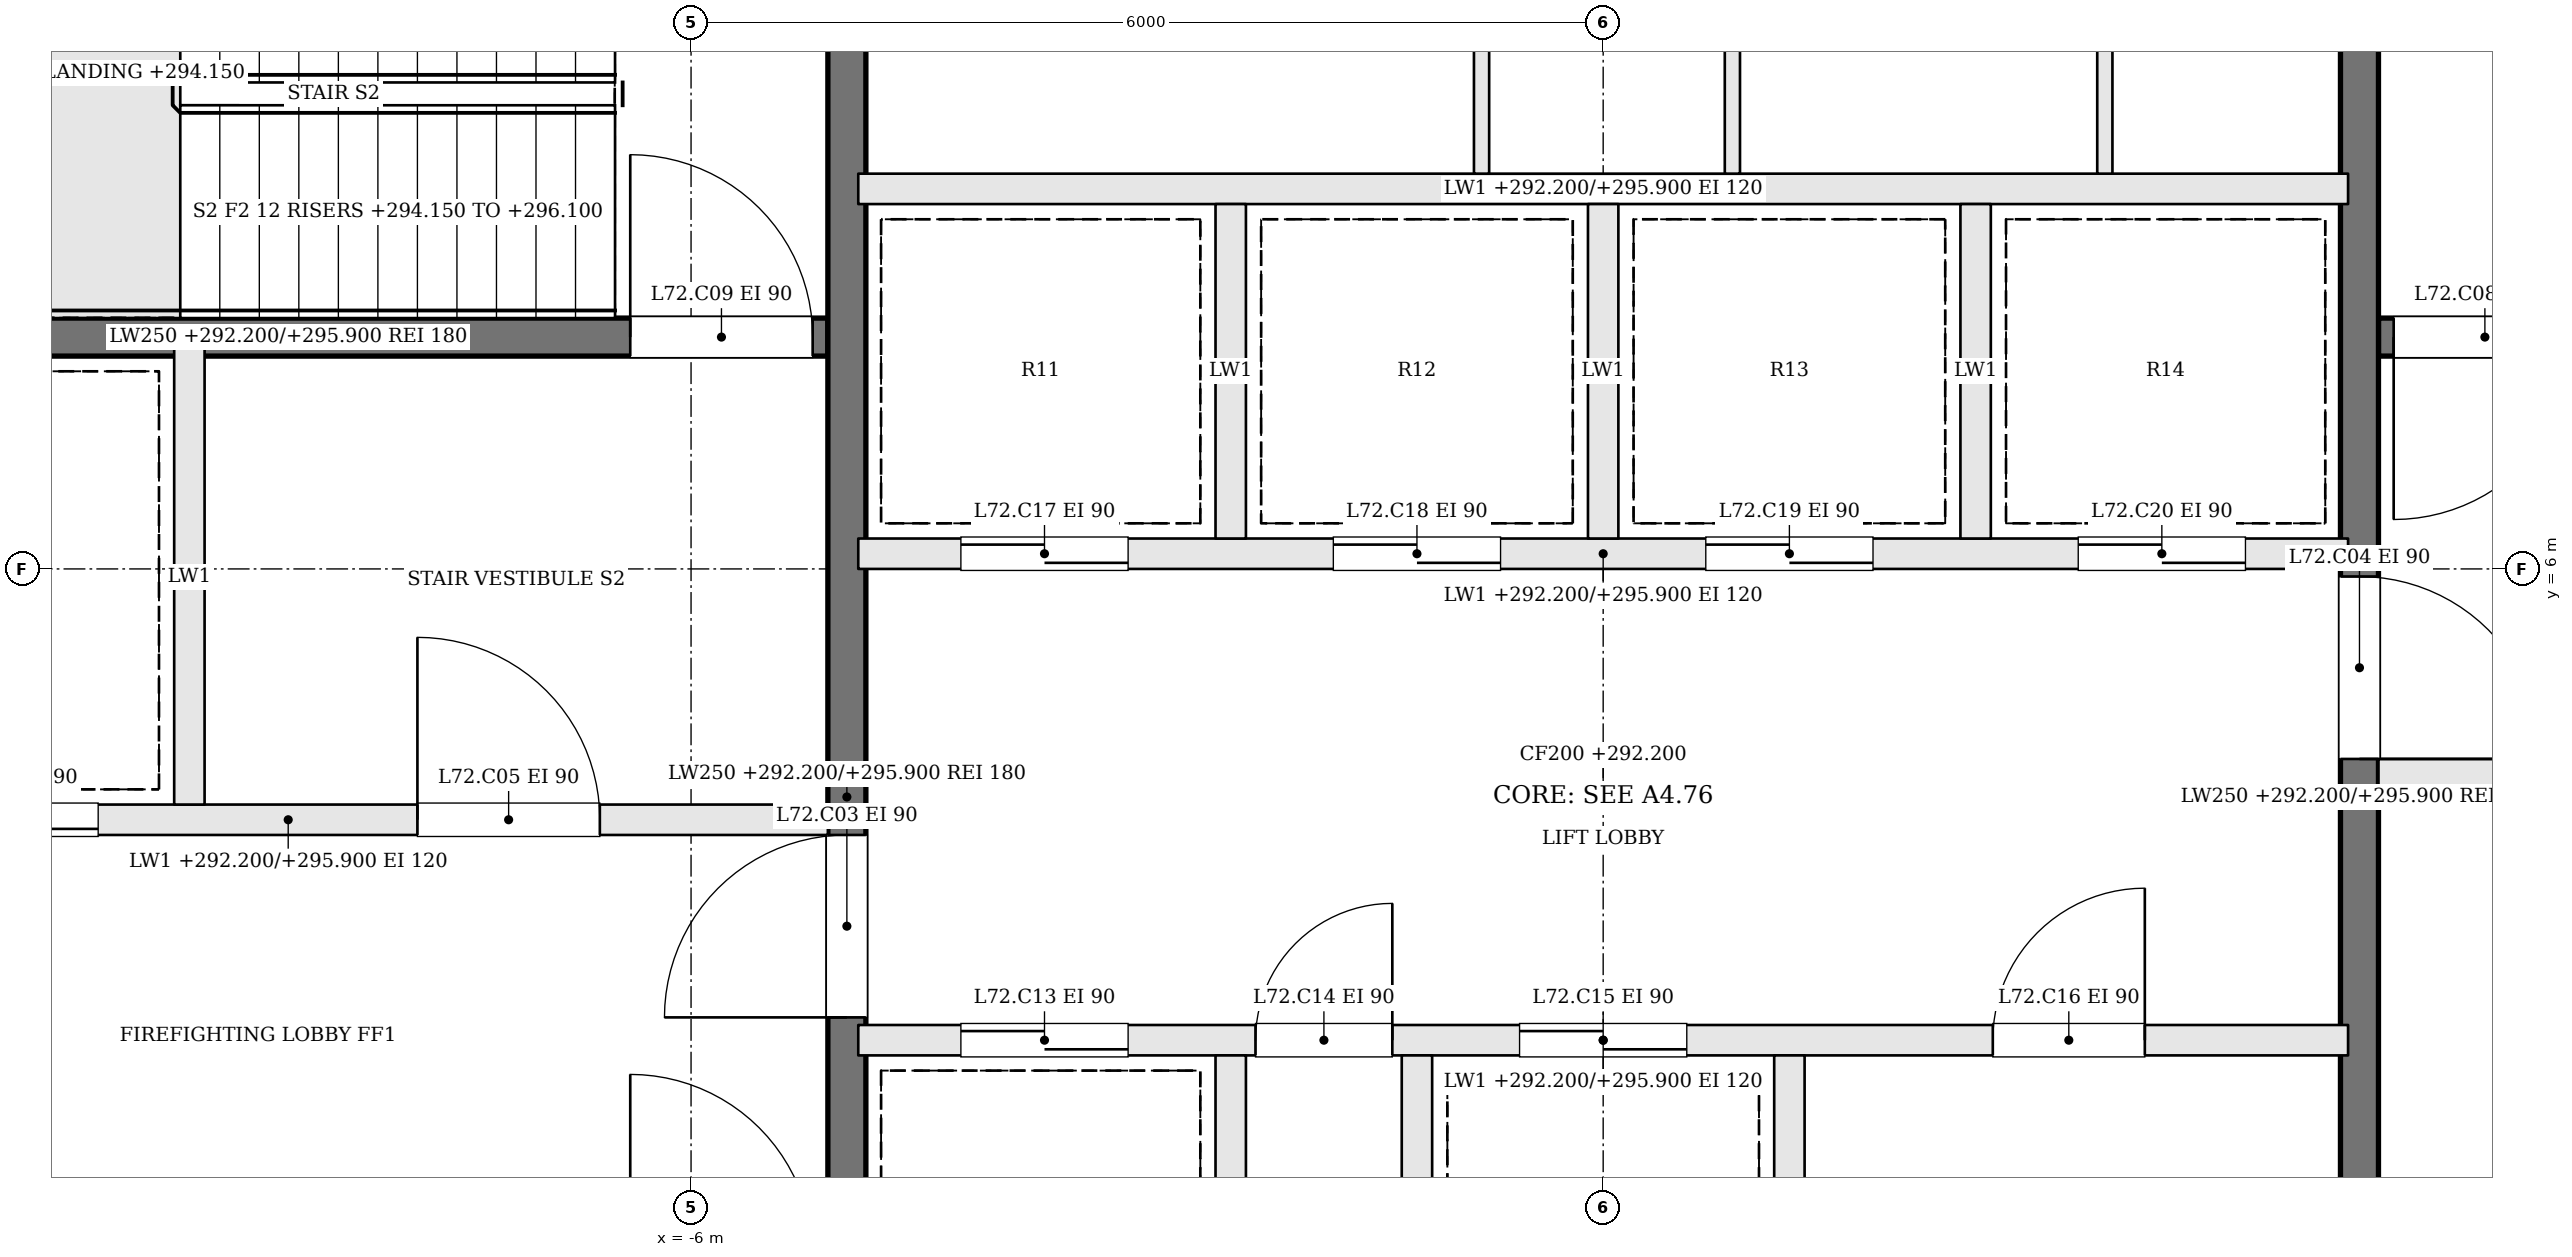
"""IFC4 building model, lengths in metres.
Left out: names, types, materials, properties, quantities, classifications, styles, units other than length and angle.
Written with IfcOpenShell. Run it as: python <this file> out.ifc"""

import sys

from ifc_helpers import new_model, si_unit, direction, frame, frame_2d, origin, place, context, subcontext, project, spatial, rectangle, extrude, element, fill, save


model = new_model("IFC4")
c1 = context("Model", 3, precision=1e-05, world=origin(), true_north=direction((0.0, 1.0)))
c2 = subcontext(c1, "Body", "Model", "MODEL_VIEW")
j1 = project(units=[si_unit("LENGTHUNIT", "METRE"), si_unit("PLANEANGLEUNIT", "RADIAN")], contexts=[c1])
p1 = place(None, origin())
s1 = spatial("IfcSite", under=j1, at=p1, CompositionType="ELEMENT")
p2 = place(p1, origin())
s2 = spatial("IfcBuilding", under=s1, at=p2, CompositionType="ELEMENT")
p3 = place(p2, frame((0.0, 0.0, 292.2)))
s3 = spatial("IfcBuildingStorey", under=s2, at=p3, CompositionType="ELEMENT", Elevation=292.2)
p4 = place(p3, frame((12.2, 7.525, 0.0), z_axis=(0.0, 0.0, 1.0), x_axis=(-1.0, 0.0, 0.0)))
e1 = element("IfcWall", 1, at=p4, inside=s3, PredefinedType="SOLIDWALL", context=c2, shape_type="SweptSolid", body=[
    extrude(rectangle(XDim=7.1, YDim=0.25, at=frame_2d((3.55, 0.0))), origin(), (0.0, 0.0, 1.0), 3.7),
])
p5 = place(p4, frame((5.8, 0.0, 0.0)))
e2 = element("IfcOpeningElement", 2, at=p5, cuts=e1, PredefinedType="OPENING", context=c2, shape_type="SweptSolid", body=[
    extrude(rectangle(XDim=1.2, YDim=2.1, at=frame_2d((0.6, 1.05))), frame((0.0, 0.135, 0.0), z_axis=(0.0, -1.0, 0.0), x_axis=(1.0, 0.0, 0.0)), (0.0, 0.0, 1.0), 0.27),
])
p6 = place(p3, frame((-12.2, 4.35, 0.0), z_axis=(0.0, 0.0, 1.0), x_axis=(1.0, 0.0, 0.0)))
e3 = element("IfcWall", 3, at=p6, inside=s3, PredefinedType="SOLIDWALL", context=c2, shape_type="SweptSolid", body=[
    extrude(rectangle(XDim=7.1, YDim=0.2, at=frame_2d((3.55, 0.0))), origin(), (0.0, 0.0, 1.0), 3.7),
])
p7 = place(p6, frame((4.4, 0.0, 0.0)))
e4 = element("IfcOpeningElement", 4, at=p7, cuts=e3, PredefinedType="OPENING", context=c2, shape_type="SweptSolid", body=[
    extrude(rectangle(XDim=1.2, YDim=2.1, at=frame_2d((0.6, 1.05))), frame((0.0, 0.11, 0.0), z_axis=(0.0, -1.0, 0.0), x_axis=(1.0, 0.0, 0.0)), (0.0, 0.0, 1.0), 0.22),
])
p8 = place(p6, frame((1.1, 0.0, 0.0)))
e5 = element("IfcOpeningElement", 5, at=p8, cuts=e3, PredefinedType="OPENING", context=c2, shape_type="SweptSolid", body=[
    extrude(rectangle(XDim=1.2, YDim=2.1, at=frame_2d((0.6, 1.05))), frame((0.0, 0.11, 0.0), z_axis=(0.0, -1.0, 0.0), x_axis=(1.0, 0.0, 0.0)), (0.0, 0.0, 1.0), 0.22),
])
p9 = place(p3, frame((12.2, 4.65, 0.0), z_axis=(0.0, 0.0, 1.0), x_axis=(-1.0, 0.0, 0.0)))
e6 = element("IfcWall", 6, at=p9, inside=s3, PredefinedType="SOLIDWALL", context=c2, shape_type="SweptSolid", body=[
    extrude(rectangle(XDim=7.1, YDim=0.2, at=frame_2d((3.55, 0.0))), origin(), (0.0, 0.0, 1.0), 3.7),
])
p10 = place(p9, frame((4.4, 0.0, 0.0)))
e7 = element("IfcOpeningElement", 7, at=p10, cuts=e6, PredefinedType="OPENING", context=c2, shape_type="SweptSolid", body=[
    extrude(rectangle(XDim=1.2, YDim=2.1, at=frame_2d((0.6, 1.05))), frame((0.0, 0.11, 0.0), z_axis=(0.0, -1.0, 0.0), x_axis=(1.0, 0.0, 0.0)), (0.0, 0.0, 1.0), 0.22),
])
p11 = place(p9, frame((1.1, 0.0, 0.0)))
e8 = element("IfcOpeningElement", 8, at=p11, cuts=e6, PredefinedType="OPENING", context=c2, shape_type="SweptSolid", body=[
    extrude(rectangle(XDim=1.2, YDim=2.1, at=frame_2d((0.6, 1.05))), frame((0.0, 0.11, 0.0), z_axis=(0.0, -1.0, 0.0), x_axis=(1.0, 0.0, 0.0)), (0.0, 0.0, 1.0), 0.22),
])
p12 = place(p3, frame((-12.2, 7.525, 0.0), z_axis=(0.0, 0.0, 1.0), x_axis=(1.0, 0.0, 0.0)))
e9 = element("IfcWall", 9, at=p12, inside=s3, PredefinedType="SOLIDWALL", context=c2, shape_type="SweptSolid", body=[
    extrude(rectangle(XDim=7.1, YDim=0.25, at=frame_2d((3.55, 0.0))), origin(), (0.0, 0.0, 1.0), 3.7),
])
p13 = place(p12, frame((5.8, 0.0, 0.0)))
e10 = element("IfcOpeningElement", 10, at=p13, cuts=e9, PredefinedType="OPENING", context=c2, shape_type="SweptSolid", body=[
    extrude(rectangle(XDim=1.2, YDim=2.1, at=frame_2d((0.6, 1.05))), frame((0.0, 0.135, 0.0), z_axis=(0.0, -1.0, 0.0), x_axis=(1.0, 0.0, 0.0)), (0.0, 0.0, 1.0), 0.27),
])
p14 = place(p3, frame((-9.3, 4.45, 0.0), z_axis=(0.0, 0.0, 1.0), x_axis=(0.0, 1.0, 0.0)))
e11 = element("IfcWall", 11, at=p14, inside=s3, PredefinedType="SOLIDWALL", context=c2, shape_type="SweptSolid", body=[
    extrude(rectangle(XDim=3.0, YDim=0.2, at=frame_2d((1.5, 0.0))), origin(), (0.0, 0.0, 1.0), 3.7),
])
p15 = place(p3, frame((-4.975, -2.2, 0.0), z_axis=(0.0, 0.0, 1.0), x_axis=(0.0, 1.0, 0.0)))
e12 = element("IfcWall", 12, at=p15, inside=s3, PredefinedType="SOLIDWALL", context=c2, shape_type="SweptSolid", body=[
    extrude(rectangle(XDim=13.4, YDim=0.25, at=frame_2d((6.7, 0.0))), origin(), (0.0, 0.0, 1.0), 3.7),
])
p16 = place(p15, frame((5.25, 0.0, 0.0)))
e13 = element("IfcOpeningElement", 13, at=p16, cuts=e12, PredefinedType="OPENING", context=c2, shape_type="SweptSolid", body=[
    extrude(rectangle(XDim=1.2, YDim=2.1, at=frame_2d((0.6, 1.05))), frame((0.0, 0.135, 0.0), z_axis=(0.0, -1.0, 0.0), x_axis=(1.0, 0.0, 0.0)), (0.0, 0.0, 1.0), 0.27),
])
p17 = place(p3, frame((4.975, 11.2, 0.0), z_axis=(0.0, 0.0, 1.0), x_axis=(0.0, -1.0, 0.0)))
e14 = element("IfcWall", 14, at=p17, inside=s3, PredefinedType="SOLIDWALL", context=c2, shape_type="SweptSolid", body=[
    extrude(rectangle(XDim=13.4, YDim=0.25, at=frame_2d((6.7, 0.0))), origin(), (0.0, 0.0, 1.0), 3.7),
])
p18 = place(p17, frame((5.25, 0.0, 0.0)))
e15 = element("IfcOpeningElement", 15, at=p18, cuts=e14, PredefinedType="OPENING", context=c2, shape_type="SweptSolid", body=[
    extrude(rectangle(XDim=1.2, YDim=2.1, at=frame_2d((0.6, 1.05))), frame((0.0, 0.135, 0.0), z_axis=(0.0, -1.0, 0.0), x_axis=(1.0, 0.0, 0.0)), (0.0, 0.0, 1.0), 0.27),
])
p19 = place(p3, frame((-4.9, 2.9, 0.0), z_axis=(0.0, 0.0, 1.0), x_axis=(1.0, 0.0, 0.0)))
e16 = element("IfcWall", 16, at=p19, inside=s3, PredefinedType="SOLIDWALL", context=c2, shape_type="SweptSolid", body=[
    extrude(rectangle(XDim=9.8, YDim=0.2, at=frame_2d((4.9, 0.0))), origin(), (0.0, 0.0, 1.0), 3.7),
])
p20 = place(p19, frame((0.675, 0.0, 0.0)))
e17 = element("IfcOpeningElement", 17, at=p20, cuts=e16, PredefinedType="OPENING", context=c2, shape_type="SweptSolid", body=[
    extrude(rectangle(XDim=1.1, YDim=2.1, at=frame_2d((0.55, 1.05))), frame((0.0, 0.11, 0.0), z_axis=(0.0, -1.0, 0.0), x_axis=(1.0, 0.0, 0.0)), (0.0, 0.0, 1.0), 0.22),
])
p21 = place(p19, frame((2.613, 0.0, 0.0)))
e18 = element("IfcOpeningElement", 18, at=p21, cuts=e16, PredefinedType="OPENING", context=c2, shape_type="SweptSolid", body=[
    extrude(rectangle(XDim=0.9, YDim=2.1, at=frame_2d((0.45, 1.05))), frame((0.0, 0.11, 0.0), z_axis=(0.0, -1.0, 0.0), x_axis=(1.0, 0.0, 0.0)), (0.0, 0.0, 1.0), 0.22),
])
p22 = place(p19, frame((4.35, 0.0, 0.0)))
e19 = element("IfcOpeningElement", 19, at=p22, cuts=e16, PredefinedType="OPENING", context=c2, shape_type="SweptSolid", body=[
    extrude(rectangle(XDim=1.1, YDim=2.1, at=frame_2d((0.55, 1.05))), frame((0.0, 0.11, 0.0), z_axis=(0.0, -1.0, 0.0), x_axis=(1.0, 0.0, 0.0)), (0.0, 0.0, 1.0), 0.22),
])
p23 = place(p19, frame((7.463, 0.0, 0.0)))
e20 = element("IfcOpeningElement", 20, at=p23, cuts=e16, PredefinedType="OPENING", context=c2, shape_type="SweptSolid", body=[
    extrude(rectangle(XDim=1.0, YDim=2.1, at=frame_2d((0.5, 1.05))), frame((0.0, 0.11, 0.0), z_axis=(0.0, -1.0, 0.0), x_axis=(1.0, 0.0, 0.0)), (0.0, 0.0, 1.0), 0.22),
])
p24 = place(p3, frame((-4.9, 6.1, 0.0), z_axis=(0.0, 0.0, 1.0), x_axis=(1.0, 0.0, 0.0)))
e21 = element("IfcWall", 21, at=p24, inside=s3, PredefinedType="SOLIDWALL", context=c2, shape_type="SweptSolid", body=[
    extrude(rectangle(XDim=9.8, YDim=0.2, at=frame_2d((4.9, 0.0))), origin(), (0.0, 0.0, 1.0), 3.7),
])
p25 = place(p24, frame((0.675, 0.0, 0.0)))
e22 = element("IfcOpeningElement", 22, at=p25, cuts=e21, PredefinedType="OPENING", context=c2, shape_type="SweptSolid", body=[
    extrude(rectangle(XDim=1.1, YDim=2.1, at=frame_2d((0.55, 1.05))), frame((0.0, 0.11, 0.0), z_axis=(0.0, -1.0, 0.0), x_axis=(1.0, 0.0, 0.0)), (0.0, 0.0, 1.0), 0.22),
])
p26 = place(p24, frame((3.125, 0.0, 0.0)))
e23 = element("IfcOpeningElement", 23, at=p26, cuts=e21, PredefinedType="OPENING", context=c2, shape_type="SweptSolid", body=[
    extrude(rectangle(XDim=1.1, YDim=2.1, at=frame_2d((0.55, 1.05))), frame((0.0, 0.11, 0.0), z_axis=(0.0, -1.0, 0.0), x_axis=(1.0, 0.0, 0.0)), (0.0, 0.0, 1.0), 0.22),
])
p27 = place(p24, frame((5.575, 0.0, 0.0)))
e24 = element("IfcOpeningElement", 24, at=p27, cuts=e21, PredefinedType="OPENING", context=c2, shape_type="SweptSolid", body=[
    extrude(rectangle(XDim=1.1, YDim=2.1, at=frame_2d((0.55, 1.05))), frame((0.0, 0.11, 0.0), z_axis=(0.0, -1.0, 0.0), x_axis=(1.0, 0.0, 0.0)), (0.0, 0.0, 1.0), 0.22),
])
p28 = place(p24, frame((8.025, 0.0, 0.0)))
e25 = element("IfcOpeningElement", 25, at=p28, cuts=e21, PredefinedType="OPENING", context=c2, shape_type="SweptSolid", body=[
    extrude(rectangle(XDim=1.1, YDim=2.1, at=frame_2d((0.55, 1.05))), frame((0.0, 0.11, 0.0), z_axis=(0.0, -1.0, 0.0), x_axis=(1.0, 0.0, 0.0)), (0.0, 0.0, 1.0), 0.22),
])
p29 = place(p3, frame((-4.9, 8.5, 0.0), z_axis=(0.0, 0.0, 1.0), x_axis=(1.0, 0.0, 0.0)))
e26 = element("IfcWall", 26, at=p29, inside=s3, PredefinedType="SOLIDWALL", context=c2, shape_type="SweptSolid", body=[
    extrude(rectangle(XDim=9.8, YDim=0.2, at=frame_2d((4.9, 0.0))), origin(), (0.0, 0.0, 1.0), 3.7),
])
for number, where, z_axis, x_axis in (
    (27, (-2.45, 0.6, 0.0), (0.0, 0.0, 1.0), (0.0, 1.0, 0.0)),
    (28, (-1.225, 0.6, 0.0), (0.0, 0.0, 1.0), (0.0, 1.0, 0.0)),
    (29, (1.225, 0.6, 0.0), (0.0, 0.0, 1.0), (0.0, 1.0, 0.0)),
    (30, (-2.45, 6.2, 0.0), (0.0, 0.0, 1.0), (0.0, 1.0, 0.0)),
    (31, (0.0, 6.2, 0.0), (0.0, 0.0, 1.0), (0.0, 1.0, 0.0)),
    (32, (2.45, 6.2, 0.0), (0.0, 0.0, 1.0), (0.0, 1.0, 0.0)),
):
    element("IfcWall", number, at=place(p3, frame(where, z_axis=z_axis, x_axis=x_axis)), inside=s3, PredefinedType="SOLIDWALL", context=c2, shape_type="SweptSolid", body=[
        extrude(rectangle(XDim=2.2, YDim=0.2, at=frame_2d((1.1, 0.0))), origin(), (0.0, 0.0, 1.0), 3.7),
    ])
for number, where, z_axis, x_axis in (
    (33, (-0.8, 8.6, 0.0), (0.0, 0.0, 1.0), (0.0, 1.0, 0.0)),
    (34, (0.85, 8.6, 0.0), (0.0, 0.0, 1.0), (0.0, 1.0, 0.0)),
    (35, (3.3, 8.6, 0.0), (0.0, 0.0, 1.0), (0.0, 1.0, 0.0)),
):
    element("IfcWall", number, at=place(p3, frame(where, z_axis=z_axis, x_axis=x_axis)), inside=s3, PredefinedType="PARTITIONING", context=c2, shape_type="SweptSolid", body=[
        extrude(rectangle(XDim=2.6, YDim=0.1, at=frame_2d((1.3, 0.0))), origin(), (0.0, 0.0, 1.0), 3.7),
    ])
p30 = place(p16, origin())
e36 = element("IfcDoor", 36, at=p30, inside=s3, OperationType="SINGLE_SWING_LEFT", PredefinedType="DOOR", context=c2, shape_type="SweptSolid", body=[
    extrude(rectangle(XDim=1.2, YDim=2.1, at=frame_2d((0.6, 1.05))), frame((0.0, 0.025, 0.0), z_axis=(0.0, -1.0, 0.0), x_axis=(1.0, 0.0, 0.0)), (0.0, 0.0, 1.0), 0.05),
])
fill(e13, e36)
p31 = place(p18, origin())
e37 = element("IfcDoor", 37, at=p31, inside=s3, OperationType="SINGLE_SWING_RIGHT", PredefinedType="DOOR", context=c2, shape_type="SweptSolid", body=[
    extrude(rectangle(XDim=1.2, YDim=2.1, at=frame_2d((0.6, 1.05))), frame((0.0, 0.025, 0.0), z_axis=(0.0, -1.0, 0.0), x_axis=(1.0, 0.0, 0.0)), (0.0, 0.0, 1.0), 0.05),
])
fill(e15, e37)
p32 = place(p7, origin())
e38 = element("IfcDoor", 38, at=p32, inside=s3, OperationType="SINGLE_SWING_LEFT", PredefinedType="DOOR", context=c2, shape_type="SweptSolid", body=[
    extrude(rectangle(XDim=1.2, YDim=2.1, at=frame_2d((0.6, 1.05))), frame((0.0, 0.025, 0.0), z_axis=(0.0, -1.0, 0.0), x_axis=(1.0, 0.0, 0.0)), (0.0, 0.0, 1.0), 0.05),
])
fill(e4, e38)
p33 = place(p5, origin())
e39 = element("IfcDoor", 39, at=p33, inside=s3, OperationType="SINGLE_SWING_RIGHT", PredefinedType="DOOR", context=c2, shape_type="SweptSolid", body=[
    extrude(rectangle(XDim=1.2, YDim=2.1, at=frame_2d((0.6, 1.05))), frame((0.0, 0.025, 0.0), z_axis=(0.0, -1.0, 0.0), x_axis=(1.0, 0.0, 0.0)), (0.0, 0.0, 1.0), 0.05),
])
fill(e2, e39)
p34 = place(p13, origin())
e40 = element("IfcDoor", 40, at=p34, inside=s3, OperationType="SINGLE_SWING_LEFT", PredefinedType="DOOR", context=c2, shape_type="SweptSolid", body=[
    extrude(rectangle(XDim=1.2, YDim=2.1, at=frame_2d((0.6, 1.05))), frame((0.0, 0.025, 0.0), z_axis=(0.0, -1.0, 0.0), x_axis=(1.0, 0.0, 0.0)), (0.0, 0.0, 1.0), 0.05),
])
fill(e10, e40)
p35 = place(p8, origin())
e41 = element("IfcDoor", 41, at=p35, inside=s3, OperationType="SLIDING_TO_RIGHT", PredefinedType="DOOR", context=c2, shape_type="SweptSolid", body=[
    extrude(rectangle(XDim=1.2, YDim=2.1, at=frame_2d((0.6, 1.05))), frame((0.0, 0.025, 0.0), z_axis=(0.0, -1.0, 0.0), x_axis=(1.0, 0.0, 0.0)), (0.0, 0.0, 1.0), 0.05),
])
fill(e5, e41)
p36 = place(p20, origin())
e42 = element("IfcDoor", 42, at=p36, inside=s3, OperationType="SLIDING_TO_RIGHT", PredefinedType="DOOR", context=c2, shape_type="SweptSolid", body=[
    extrude(rectangle(XDim=1.1, YDim=2.1, at=frame_2d((0.55, 1.05))), frame((0.0, 0.025, 0.0), z_axis=(0.0, -1.0, 0.0), x_axis=(1.0, 0.0, 0.0)), (0.0, 0.0, 1.0), 0.05),
])
fill(e17, e42)
p37 = place(p21, origin())
e43 = element("IfcDoor", 43, at=p37, inside=s3, OperationType="SINGLE_SWING_RIGHT", PredefinedType="DOOR", context=c2, shape_type="SweptSolid", body=[
    extrude(rectangle(XDim=0.9, YDim=2.1, at=frame_2d((0.45, 1.05))), frame((0.0, 0.025, 0.0), z_axis=(0.0, -1.0, 0.0), x_axis=(1.0, 0.0, 0.0)), (0.0, 0.0, 1.0), 0.05),
])
fill(e18, e43)
p38 = place(p22, origin())
e44 = element("IfcDoor", 44, at=p38, inside=s3, OperationType="SLIDING_TO_LEFT", PredefinedType="DOOR", context=c2, shape_type="SweptSolid", body=[
    extrude(rectangle(XDim=1.1, YDim=2.1, at=frame_2d((0.55, 1.05))), frame((0.0, 0.025, 0.0), z_axis=(0.0, -1.0, 0.0), x_axis=(1.0, 0.0, 0.0)), (0.0, 0.0, 1.0), 0.05),
])
fill(e19, e44)
p39 = place(p23, origin())
e45 = element("IfcDoor", 45, at=p39, inside=s3, OperationType="SINGLE_SWING_RIGHT", PredefinedType="DOOR", context=c2, shape_type="SweptSolid", body=[
    extrude(rectangle(XDim=1.0, YDim=2.1, at=frame_2d((0.5, 1.05))), frame((0.0, 0.025, 0.0), z_axis=(0.0, -1.0, 0.0), x_axis=(1.0, 0.0, 0.0)), (0.0, 0.0, 1.0), 0.05),
])
fill(e20, e45)
p40 = place(p25, origin())
e46 = element("IfcDoor", 46, at=p40, inside=s3, OperationType="SLIDING_TO_RIGHT", PredefinedType="DOOR", context=c2, shape_type="SweptSolid", body=[
    extrude(rectangle(XDim=1.1, YDim=2.1, at=frame_2d((0.55, 1.05))), frame((0.0, 0.025, 0.0), z_axis=(0.0, -1.0, 0.0), x_axis=(1.0, 0.0, 0.0)), (0.0, 0.0, 1.0), 0.05),
])
fill(e22, e46)
p41 = place(p26, origin())
e47 = element("IfcDoor", 47, at=p41, inside=s3, OperationType="SLIDING_TO_LEFT", PredefinedType="DOOR", context=c2, shape_type="SweptSolid", body=[
    extrude(rectangle(XDim=1.1, YDim=2.1, at=frame_2d((0.55, 1.05))), frame((0.0, 0.025, 0.0), z_axis=(0.0, -1.0, 0.0), x_axis=(1.0, 0.0, 0.0)), (0.0, 0.0, 1.0), 0.05),
])
fill(e23, e47)
p42 = place(p27, origin())
e48 = element("IfcDoor", 48, at=p42, inside=s3, OperationType="SLIDING_TO_RIGHT", PredefinedType="DOOR", context=c2, shape_type="SweptSolid", body=[
    extrude(rectangle(XDim=1.1, YDim=2.1, at=frame_2d((0.55, 1.05))), frame((0.0, 0.025, 0.0), z_axis=(0.0, -1.0, 0.0), x_axis=(1.0, 0.0, 0.0)), (0.0, 0.0, 1.0), 0.05),
])
fill(e24, e48)
p43 = place(p28, origin())
e49 = element("IfcDoor", 49, at=p43, inside=s3, OperationType="SLIDING_TO_LEFT", PredefinedType="DOOR", context=c2, shape_type="SweptSolid", body=[
    extrude(rectangle(XDim=1.1, YDim=2.1, at=frame_2d((0.55, 1.05))), frame((0.0, 0.025, 0.0), z_axis=(0.0, -1.0, 0.0), x_axis=(1.0, 0.0, 0.0)), (0.0, 0.0, 1.0), 0.05),
])
fill(e25, e49)
save(model, sys.argv[1])
